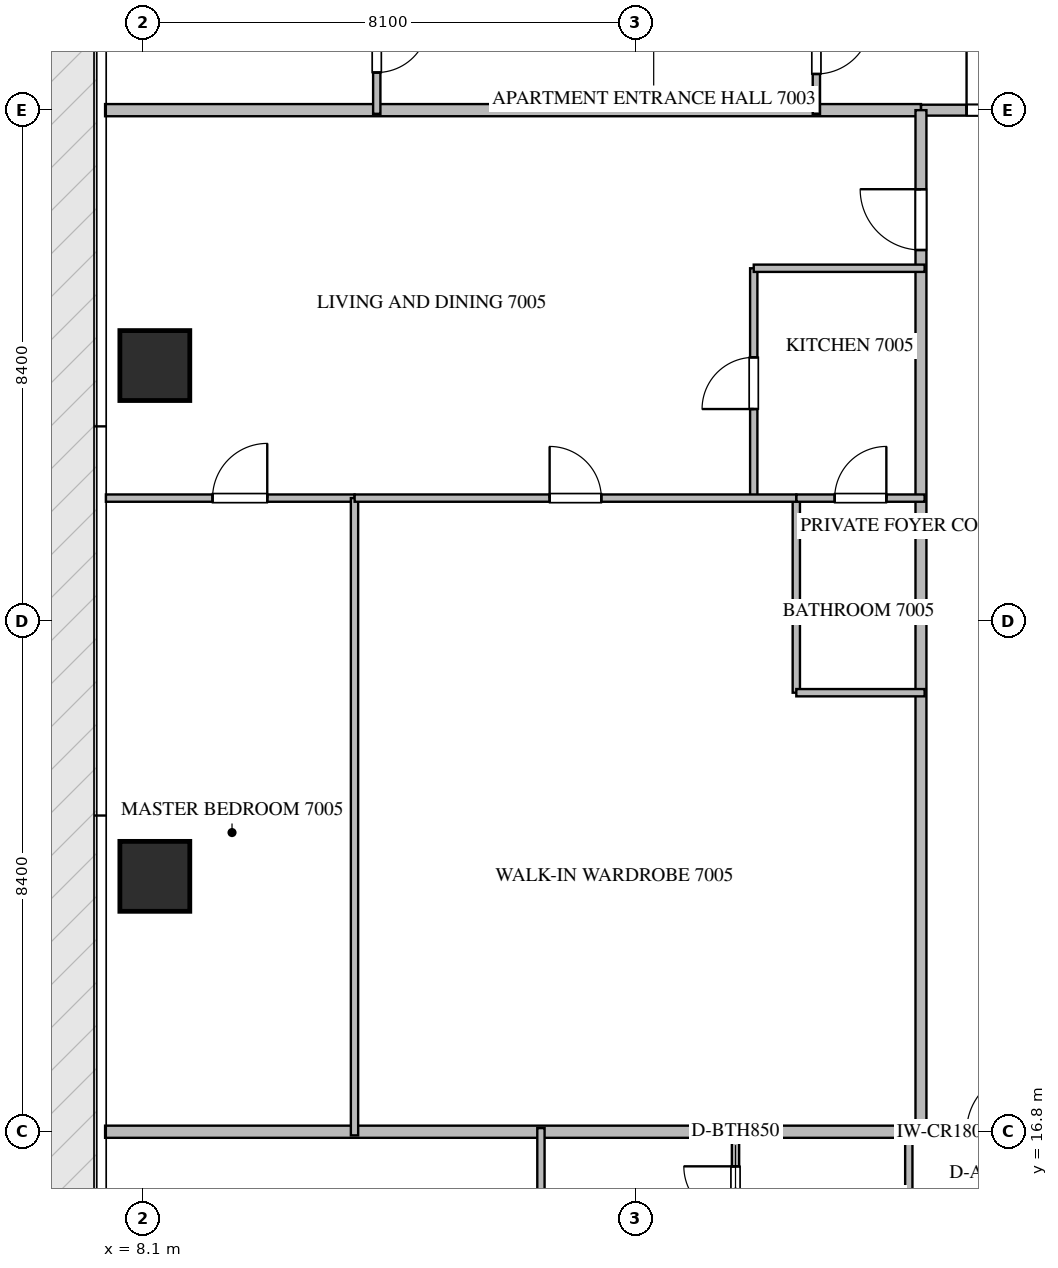
"""IFC4 building model, lengths in metres.
Left out: names, types, materials, properties, quantities, classifications, styles, units other than length and angle.
Written with IfcOpenShell. Run it as: python <this file> out.ifc"""

import sys

from ifc_helpers import new_model, si_unit, direction, frame, frame_2d, origin, origin_2d, place, context, subcontext, project, spatial, rectangle, extrude, source, transform, mapped, element, fill, save


model = new_model("IFC4")
c1 = context("Model", 3, precision=1e-05, world=origin(), true_north=direction((0.0, 1.0)))
c2 = subcontext(c1, "Body", "Model", "MODEL_VIEW")
j1 = project(units=[si_unit("LENGTHUNIT", "METRE"), si_unit("PLANEANGLEUNIT", "RADIAN")], contexts=[c1])
p1 = place(None, origin())
s1 = spatial("IfcSite", under=j1, at=p1, CompositionType="ELEMENT")
p2 = place(p1, origin())
s2 = spatial("IfcBuilding", under=s1, at=p2, CompositionType="ELEMENT")
p3 = place(p2, frame((0.0, 0.0, 279.75)))
s3 = spatial("IfcBuildingStorey", under=s2, at=p3, CompositionType="ELEMENT", Elevation=279.75)
m1 = source(origin(), c2, "Body", "SweptSolid", [
    extrude(rectangle(XDim=1.15, YDim=1.15, at=origin_2d()), origin(), (0.0, 0.0, 1.0), 3.85),
])
for number, where, z_axis, x_axis in (
    (1, (8.3, 21.0, -0.26), (0.0, 0.0, 1.0), (1.0, 0.0, 0.0)),
    (2, (8.3, 29.4, -0.26), (0.0, 0.0, 1.0), (1.0, 0.0, 0.0)),
):
    element("IfcColumn", number, at=place(p3, frame(where, z_axis=z_axis, x_axis=x_axis)), inside=s3, PredefinedType="COLUMN", context=c2, shape_type="MappedRepresentation", body=[
        mapped(m1, transform((0.0, 0.0, 0.0), scale=1.0)),
    ])
for number, where, z_axis, x_axis in (
    (3, (7.482, 16.8, 0.0), (0.0, 0.0, 1.0), (1.0, 0.0, 0.0)),
    (4, (7.482, 33.6, 0.0), (0.0, 0.0, 1.0), (1.0, 0.0, 0.0)),
):
    element("IfcWall", number, at=place(p3, frame(where, z_axis=z_axis, x_axis=x_axis)), inside=s3, PredefinedType="PARTITIONING", context=c2, shape_type="SweptSolid", body=[
        extrude(rectangle(XDim=13.418, YDim=0.2, at=frame_2d((6.709, 0.0))), origin(), (0.0, 0.0, 1.0), 3.59),
    ])
p4 = place(p3, frame((20.902, 16.8, 0.0), z_axis=(0.0, 0.0, 1.0), x_axis=(1.0, 0.0, 0.0)))
e5 = element("IfcWall", 5, at=p4, inside=s3, PredefinedType="PARTITIONING", context=c2, shape_type="SweptSolid", body=[
    extrude(rectangle(XDim=2.496, YDim=0.18, at=frame_2d((1.248, 0.0))), origin(), (0.0, 0.0, 1.0), 3.59),
])
p5 = place(p4, frame((0.748, 0.0, 0.0)))
e6 = element("IfcOpeningElement", 6, at=p5, cuts=e5, PredefinedType="OPENING", context=c2, shape_type="SweptSolid", body=[
    extrude(rectangle(XDim=1.0, YDim=2.15, at=frame_2d((0.5, 1.075))), frame((0.0, 0.1, 0.0), z_axis=(0.0, -1.0, 0.0), x_axis=(1.0, 0.0, 0.0)), (0.0, 0.0, 1.0), 0.2),
])
p6 = place(p3, frame((20.902, 33.6, 0.0), z_axis=(0.0, 0.0, 1.0), x_axis=(1.0, 0.0, 0.0)))
e7 = element("IfcWall", 7, at=p6, inside=s3, PredefinedType="PARTITIONING", context=c2, shape_type="SweptSolid", body=[
    extrude(rectangle(XDim=2.496, YDim=0.18, at=frame_2d((1.248, 0.0))), origin(), (0.0, 0.0, 1.0), 3.59),
])
p7 = place(p6, frame((0.748, 0.0, 0.0)))
e8 = element("IfcOpeningElement", 8, at=p7, cuts=e7, PredefinedType="OPENING", context=c2, shape_type="SweptSolid", body=[
    extrude(rectangle(XDim=1.0, YDim=2.15, at=frame_2d((0.5, 1.075))), frame((0.0, 0.1, 0.0), z_axis=(0.0, -1.0, 0.0), x_axis=(1.0, 0.0, 0.0)), (0.0, 0.0, 1.0), 0.2),
])
p8 = place(p3, frame((20.9, 16.8, 0.0), z_axis=(0.0, 0.0, 1.0), x_axis=(0.0, 1.0, 0.0)))
e9 = element("IfcWall", 9, at=p8, inside=s3, PredefinedType="PARTITIONING", context=c2, shape_type="SweptSolid", body=[
    extrude(rectangle(XDim=16.8, YDim=0.18, at=frame_2d((8.4, 0.0))), origin(), (0.0, 0.0, 1.0), 3.59),
])
p9 = place(p8, frame((14.5, 0.0, 0.0)))
e10 = element("IfcOpeningElement", 10, at=p9, cuts=e9, PredefinedType="OPENING", context=c2, shape_type="SweptSolid", body=[
    extrude(rectangle(XDim=1.0, YDim=2.15, at=frame_2d((0.5, 1.075))), frame((0.0, 0.1, 0.0), z_axis=(0.0, -1.0, 0.0), x_axis=(1.0, 0.0, 0.0)), (0.0, 0.0, 1.0), 0.2),
])
p10 = place(p3, frame((20.7, 14.05, 0.0), z_axis=(0.0, 0.0, 1.0), x_axis=(0.0, 1.0, 0.0)))
e11 = element("IfcWall", 11, at=p10, inside=s3, PredefinedType="PARTITIONING", context=c2, shape_type="SweptSolid", body=[
    extrude(rectangle(XDim=2.81, YDim=0.12, at=frame_2d((1.405, 0.0))), origin(), (0.0, 0.0, 1.0), 3.59),
])
p11 = place(p3, frame((14.65, 14.75, 0.0), z_axis=(0.0, 0.0, 1.0), x_axis=(0.0, 1.0, 0.0)))
e12 = element("IfcWall", 12, at=p11, inside=s3, PredefinedType="PARTITIONING", context=c2, shape_type="SweptSolid", body=[
    extrude(rectangle(XDim=2.11, YDim=0.12, at=frame_2d((1.055, 0.0))), origin(), (0.0, 0.0, 1.0), 3.59),
])
p12 = place(p3, frame((17.85, 14.752, 0.0), z_axis=(0.0, 0.0, 1.0), x_axis=(0.0, 1.0, 0.0)))
e13 = element("IfcWall", 13, at=p12, inside=s3, PredefinedType="PARTITIONING", context=c2, shape_type="SweptSolid", body=[
    extrude(rectangle(XDim=2.108, YDim=0.12, at=frame_2d((1.054, 0.0))), origin(), (0.0, 0.0, 1.0), 3.59),
])
p13 = place(p12, frame((0.629, 0.0, 0.0)))
e14 = element("IfcOpeningElement", 14, at=p13, cuts=e13, PredefinedType="OPENING", context=c2, shape_type="SweptSolid", body=[
    extrude(rectangle(XDim=0.85, YDim=2.1, at=frame_2d((0.425, 1.05))), frame((0.0, 0.07, 0.0), z_axis=(0.0, -1.0, 0.0), x_axis=(1.0, 0.0, 0.0)), (0.0, 0.0, 1.0), 0.14),
])
p14 = place(p3, frame((19.18, 35.75, 0.0), z_axis=(0.0, 0.0, 1.0), x_axis=(0.0, -1.0, 0.0)))
e15 = element("IfcWall", 15, at=p14, inside=s3, PredefinedType="PARTITIONING", context=c2, shape_type="SweptSolid", body=[
    extrude(rectangle(XDim=2.21, YDim=0.12, at=frame_2d((1.105, 0.0))), origin(), (0.0, 0.0, 1.0), 3.59),
])
p15 = place(p14, frame((0.655, 0.0, 0.0)))
e16 = element("IfcOpeningElement", 16, at=p15, cuts=e15, PredefinedType="OPENING", context=c2, shape_type="SweptSolid", body=[
    extrude(rectangle(XDim=0.9, YDim=2.1, at=frame_2d((0.45, 1.05))), frame((0.0, 0.07, 0.0), z_axis=(0.0, -1.0, 0.0), x_axis=(1.0, 0.0, 0.0)), (0.0, 0.0, 1.0), 0.14),
])
p16 = place(p3, frame((11.95, 35.748, 0.0), z_axis=(0.0, 0.0, 1.0), x_axis=(0.0, -1.0, 0.0)))
e17 = element("IfcWall", 17, at=p16, inside=s3, PredefinedType="PARTITIONING", context=c2, shape_type="SweptSolid", body=[
    extrude(rectangle(XDim=2.208, YDim=0.12, at=frame_2d((1.104, 0.0))), origin(), (0.0, 0.0, 1.0), 3.59),
])
p17 = place(p16, frame((0.679, 0.0, 0.0)))
e18 = element("IfcOpeningElement", 18, at=p17, cuts=e17, PredefinedType="OPENING", context=c2, shape_type="SweptSolid", body=[
    extrude(rectangle(XDim=0.85, YDim=2.1, at=frame_2d((0.425, 1.05))), frame((0.0, 0.07, 0.0), z_axis=(0.0, -1.0, 0.0), x_axis=(1.0, 0.0, 0.0)), (0.0, 0.0, 1.0), 0.14),
])
p18 = place(p3, frame((18.15, 27.22, 0.0), z_axis=(0.0, 0.0, 1.0), x_axis=(0.0, 1.0, 0.0)))
e19 = element("IfcWall", 19, at=p18, inside=s3, PredefinedType="PARTITIONING", context=c2, shape_type="SweptSolid", body=[
    extrude(rectangle(XDim=3.78, YDim=0.12, at=frame_2d((1.89, 0.0))), origin(), (0.0, 0.0, 1.0), 3.59),
])
p19 = place(p18, frame((1.465, 0.0, 0.0)))
e20 = element("IfcOpeningElement", 20, at=p19, cuts=e19, PredefinedType="OPENING", context=c2, shape_type="SweptSolid", body=[
    extrude(rectangle(XDim=0.85, YDim=2.1, at=frame_2d((0.425, 1.05))), frame((0.0, 0.07, 0.0), z_axis=(0.0, -1.0, 0.0), x_axis=(1.0, 0.0, 0.0)), (0.0, 0.0, 1.0), 0.14),
])
p20 = place(p3, frame((18.15, 31.0, 0.0), z_axis=(0.0, 0.0, 1.0), x_axis=(1.0, 0.0, 0.0)))
e21 = element("IfcWall", 21, at=p20, inside=s3, PredefinedType="PARTITIONING", context=c2, shape_type="SweptSolid", body=[
    extrude(rectangle(XDim=2.81, YDim=0.12, at=frame_2d((1.405, 0.0))), origin(), (0.0, 0.0, 1.0), 3.59),
])
p21 = place(p3, frame((7.495, 27.22, 0.0), z_axis=(0.0, 0.0, 1.0), x_axis=(1.0, 0.0, 0.0)))
e22 = element("IfcWall", 22, at=p21, inside=s3, PredefinedType="PARTITIONING", context=c2, shape_type="SweptSolid", body=[
    extrude(rectangle(XDim=4.089, YDim=0.12, at=frame_2d((2.044, 0.0))), origin(), (0.0, 0.0, 1.0), 3.59),
])
p22 = place(p21, frame((1.754, 0.0, 0.0)))
e23 = element("IfcOpeningElement", 23, at=p22, cuts=e22, PredefinedType="OPENING", context=c2, shape_type="SweptSolid", body=[
    extrude(rectangle(XDim=0.9, YDim=2.1, at=frame_2d((0.45, 1.05))), frame((0.0, 0.07, 0.0), z_axis=(0.0, -1.0, 0.0), x_axis=(1.0, 0.0, 0.0)), (0.0, 0.0, 1.0), 0.14),
])
p23 = place(p3, frame((11.584, 16.74, 0.0), z_axis=(0.0, 0.0, 1.0), x_axis=(0.0, 1.0, 0.0)))
e24 = element("IfcWall", 24, at=p23, inside=s3, PredefinedType="PARTITIONING", context=c2, shape_type="SweptSolid", body=[
    extrude(rectangle(XDim=10.48, YDim=0.12, at=frame_2d((5.24, 0.0))), origin(), (0.0, 0.0, 1.0), 3.59),
])
p24 = place(p3, frame((18.85, 24.02, 0.0), z_axis=(0.0, 0.0, 1.0), x_axis=(0.0, 1.0, 0.0)))
e25 = element("IfcWall", 25, at=p24, inside=s3, PredefinedType="PARTITIONING", context=c2, shape_type="SweptSolid", body=[
    extrude(rectangle(XDim=3.2, YDim=0.12, at=frame_2d((1.6, 0.0))), origin(), (0.0, 0.0, 1.0), 3.59),
])
p25 = place(p3, frame((18.85, 24.02, 0.0), z_axis=(0.0, 0.0, 1.0), x_axis=(1.0, 0.0, 0.0)))
e26 = element("IfcWall", 26, at=p25, inside=s3, PredefinedType="PARTITIONING", context=c2, shape_type="SweptSolid", body=[
    extrude(rectangle(XDim=2.11, YDim=0.12, at=frame_2d((1.055, 0.0))), origin(), (0.0, 0.0, 1.0), 3.59),
])
p26 = place(p3, frame((11.586, 27.22, 0.0), z_axis=(0.0, 0.0, 1.0), x_axis=(1.0, 0.0, 0.0)))
e27 = element("IfcWall", 27, at=p26, inside=s3, PredefinedType="PARTITIONING", context=c2, shape_type="SweptSolid", body=[
    extrude(rectangle(XDim=7.264, YDim=0.12, at=frame_2d((3.632, 0.0))), origin(), (0.0, 0.0, 1.0), 3.59),
])
p27 = place(p26, frame((3.207, 0.0, 0.0)))
e28 = element("IfcOpeningElement", 28, at=p27, cuts=e27, PredefinedType="OPENING", context=c2, shape_type="SweptSolid", body=[
    extrude(rectangle(XDim=0.85, YDim=2.1, at=frame_2d((0.425, 1.05))), frame((0.0, 0.07, 0.0), z_axis=(0.0, -1.0, 0.0), x_axis=(1.0, 0.0, 0.0)), (0.0, 0.0, 1.0), 0.14),
])
p28 = place(p3, frame((18.852, 27.22, 0.0), z_axis=(0.0, 0.0, 1.0), x_axis=(1.0, 0.0, 0.0)))
e29 = element("IfcWall", 29, at=p28, inside=s3, PredefinedType="PARTITIONING", context=c2, shape_type="SweptSolid", body=[
    extrude(rectangle(XDim=2.108, YDim=0.12, at=frame_2d((1.054, 0.0))), origin(), (0.0, 0.0, 1.0), 3.59),
])
p29 = place(p28, frame((0.629, 0.0, 0.0)))
e30 = element("IfcOpeningElement", 30, at=p29, cuts=e29, PredefinedType="OPENING", context=c2, shape_type="SweptSolid", body=[
    extrude(rectangle(XDim=0.85, YDim=2.1, at=frame_2d((0.425, 1.05))), frame((0.0, 0.07, 0.0), z_axis=(0.0, -1.0, 0.0), x_axis=(1.0, 0.0, 0.0)), (0.0, 0.0, 1.0), 0.14),
])
m2 = source(origin(), c2, "Body", "SweptSolid", [
    extrude(rectangle(XDim=1.0, YDim=2.15, at=frame_2d((0.5, 1.075))), frame((0.0, 0.025, 0.0), z_axis=(0.0, -1.0, 0.0), x_axis=(1.0, 0.0, 0.0)), (0.0, 0.0, 1.0), 0.05),
])
p30 = place(p5, origin())
e31 = element("IfcDoor", 31, at=p30, inside=s3, OperationType="SINGLE_SWING_RIGHT", PredefinedType="DOOR", context=c2, shape_type="MappedRepresentation", body=[
    mapped(m2, transform((0.0, 0.0, 0.0), scale=1.0)),
])
fill(e6, e31)
p31 = place(p7, origin())
e32 = element("IfcDoor", 32, at=p31, inside=s3, OperationType="SINGLE_SWING_LEFT", PredefinedType="DOOR", context=c2, shape_type="MappedRepresentation", body=[
    mapped(m2, transform((0.0, 0.0, 0.0), scale=1.0)),
])
fill(e8, e32)
p32 = place(p9, origin())
e33 = element("IfcDoor", 33, at=p32, inside=s3, OperationType="SINGLE_SWING_RIGHT", PredefinedType="DOOR", context=c2, shape_type="MappedRepresentation", body=[
    mapped(m2, transform((0.0, 0.0, 0.0), scale=1.0)),
])
fill(e10, e33)
m3 = source(origin(), c2, "Body", "SweptSolid", [
    extrude(rectangle(XDim=0.85, YDim=2.1, at=frame_2d((0.425, 1.05))), frame((0.0, 0.025, 0.0), z_axis=(0.0, -1.0, 0.0), x_axis=(1.0, 0.0, 0.0)), (0.0, 0.0, 1.0), 0.05),
])
p33 = place(p13, origin())
e34 = element("IfcDoor", 34, at=p33, inside=s3, OperationType="SINGLE_SWING_RIGHT", PredefinedType="DOOR", context=c2, shape_type="MappedRepresentation", body=[
    mapped(m3, transform((0.0, 0.0, 0.0), scale=1.0)),
])
fill(e14, e34)
m4 = source(origin(), c2, "Body", "SweptSolid", [
    extrude(rectangle(XDim=0.9, YDim=2.1, at=frame_2d((0.45, 1.05))), frame((0.0, 0.025, 0.0), z_axis=(0.0, -1.0, 0.0), x_axis=(1.0, 0.0, 0.0)), (0.0, 0.0, 1.0), 0.05),
])
p34 = place(p15, origin())
e35 = element("IfcDoor", 35, at=p34, inside=s3, OperationType="SINGLE_SWING_LEFT", PredefinedType="DOOR", context=c2, shape_type="MappedRepresentation", body=[
    mapped(m4, transform((0.0, 0.0, 0.0), scale=1.0)),
])
fill(e16, e35)
p35 = place(p17, origin())
e36 = element("IfcDoor", 36, at=p35, inside=s3, OperationType="SINGLE_SWING_LEFT", PredefinedType="DOOR", context=c2, shape_type="MappedRepresentation", body=[
    mapped(m3, transform((0.0, 0.0, 0.0), scale=1.0)),
])
fill(e18, e36)
p36 = place(p19, origin())
e37 = element("IfcDoor", 37, at=p36, inside=s3, OperationType="SINGLE_SWING_LEFT", PredefinedType="DOOR", context=c2, shape_type="MappedRepresentation", body=[
    mapped(m3, transform((0.0, 0.0, 0.0), scale=1.0)),
])
fill(e20, e37)
p37 = place(p22, origin())
e38 = element("IfcDoor", 38, at=p37, inside=s3, OperationType="SINGLE_SWING_RIGHT", PredefinedType="DOOR", context=c2, shape_type="MappedRepresentation", body=[
    mapped(m4, transform((0.0, 0.0, 0.0), scale=1.0)),
])
fill(e23, e38)
p38 = place(p27, origin())
e39 = element("IfcDoor", 39, at=p38, inside=s3, OperationType="SINGLE_SWING_LEFT", PredefinedType="DOOR", context=c2, shape_type="MappedRepresentation", body=[
    mapped(m3, transform((0.0, 0.0, 0.0), scale=1.0)),
])
fill(e28, e39)
p39 = place(p29, origin())
e40 = element("IfcDoor", 40, at=p39, inside=s3, OperationType="SINGLE_SWING_RIGHT", PredefinedType="DOOR", context=c2, shape_type="MappedRepresentation", body=[
    mapped(m3, transform((0.0, 0.0, 0.0), scale=1.0)),
])
fill(e30, e40)
save(model, sys.argv[1])
